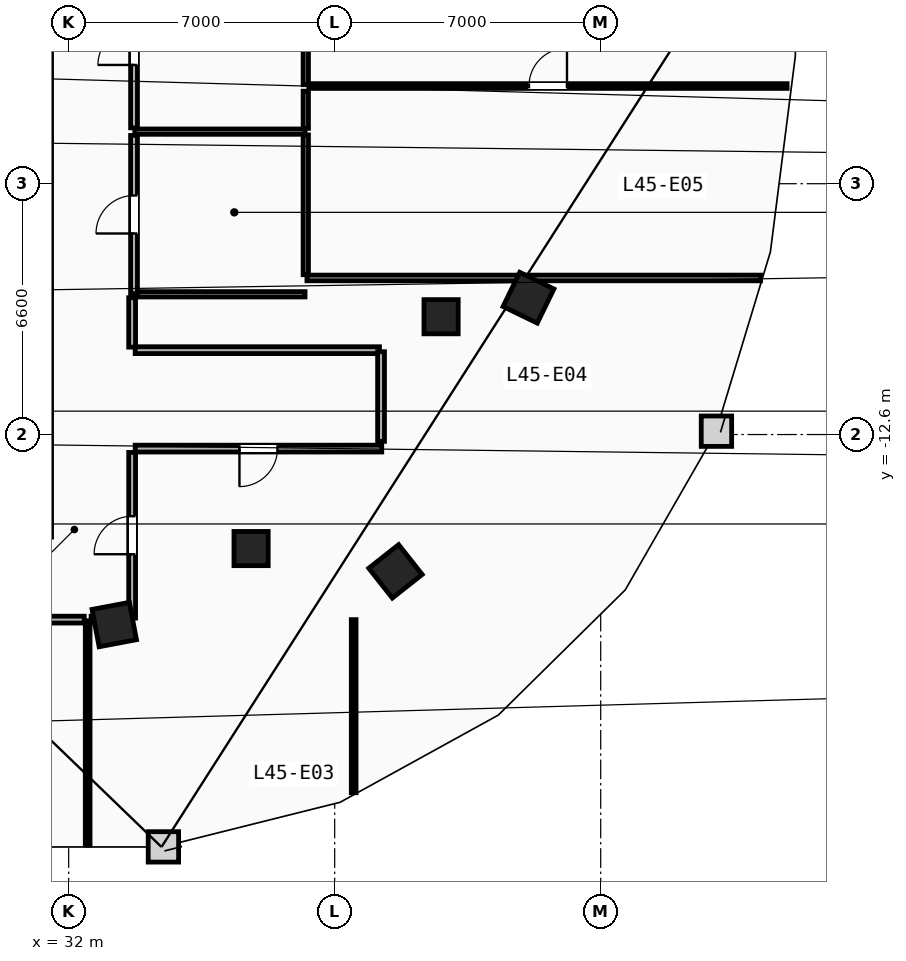
"""IFC4 building model, lengths in metres.
Left out: names, types, materials, properties, quantities, classifications, styles, units other than length and angle.
Written with IfcOpenShell. Run it as: python <this file> out.ifc"""

import sys

from ifc_helpers import new_model, si_unit, direction, frame, frame_2d, origin, origin_2d, place, context, subcontext, project, spatial, rectangle, extrude, element, fill, save


model = new_model("IFC4")
c1 = context("Model", 3, precision=1e-05, world=origin(), true_north=direction((0.0, 1.0)))
c2 = subcontext(c1, "Body", "Model", "MODEL_VIEW")
j1 = project(units=[si_unit("LENGTHUNIT", "METRE"), si_unit("PLANEANGLEUNIT", "RADIAN")], contexts=[c1])
p1 = place(None, origin())
s1 = spatial("IfcSite", under=j1, at=p1, CompositionType="ELEMENT")
p2 = place(p1, origin())
s2 = spatial("IfcBuilding", under=s1, at=p2, CompositionType="ELEMENT")
p3 = place(p2, frame((0.0, 0.0, 172.8)))
s3 = spatial("IfcBuildingStorey", under=s2, at=p3, CompositionType="ELEMENT", Elevation=172.8)
for number, where, z_axis, x_axis in (
    (1, (41.8, -9.5, 0.0), (0.0, 0.0, 1.0), (1.0, 0.0, 0.0)),
    (2, (36.8, -15.6, 0.0), (0.0, 0.0, 1.0), (1.0, 0.0, 0.0)),
):
    element("IfcColumn", number, at=place(p3, frame(where, z_axis=z_axis, x_axis=x_axis)), inside=s3, PredefinedType="COLUMN", context=c2, shape_type="SweptSolid", body=[
        extrude(rectangle(XDim=0.9, YDim=0.9, at=origin_2d()), origin(), (0.0, 0.0, 1.0), 3.6),
    ])
for number, where, z_axis, x_axis in (
    (3, (33.2, -17.6, 0.0), (0.0, 0.0, 1.0), (0.983, 0.186, 0.0)),
    (4, (40.6, -16.2, 0.0), (0.0, 0.0, 1.0), (0.785, 0.619, 0.0)),
    (5, (44.1, -9.0, 0.0), (0.0, 0.0, 1.0), (0.437, 0.899, 0.0)),
):
    element("IfcColumn", number, at=place(p3, frame(where, z_axis=z_axis, x_axis=x_axis)), inside=s3, PredefinedType="COLUMN", context=c2, shape_type="SweptSolid", body=[
        extrude(rectangle(XDim=1.0, YDim=1.0, at=origin_2d()), origin(), (0.0, 0.0, 1.0), 3.6),
    ])
p4 = place(p3, frame((38.24, -8.395, 0.0), z_axis=(0.0, 0.0, 1.0), x_axis=(0.0, 1.0, 0.0)))
e6 = element("IfcWall", 6, at=p4, inside=s3, PredefinedType="PARTITIONING", context=c2, shape_type="SweptSolid", body=[
    extrude(rectangle(XDim=3.68, YDim=0.14, at=frame_2d((1.84, 0.0))), origin(), (0.0, 0.0, 1.0), 3.36),
])
p5 = place(p3, frame((38.24, -4.545, 0.0), z_axis=(0.0, 0.0, 1.0), x_axis=(0.0, 1.0, 0.0)))
e7 = element("IfcWall", 7, at=p5, inside=s3, PredefinedType="PARTITIONING", context=c2, shape_type="SweptSolid", body=[
    extrude(rectangle(XDim=0.98, YDim=0.14, at=frame_2d((0.49, 0.0))), origin(), (0.0, 0.0, 1.0), 3.36),
])
p6 = place(p3, frame((38.24, -3.395, 0.0), z_axis=(0.0, 0.0, 1.0), x_axis=(0.0, 1.0, 0.0)))
e8 = element("IfcWall", 8, at=p6, inside=s3, PredefinedType="PARTITIONING", context=c2, shape_type="SweptSolid", body=[
    extrude(rectangle(XDim=3.125, YDim=0.14, at=frame_2d((1.562, 0.0))), origin(), (0.0, 0.0, 1.0), 3.36),
])
for number, where, z_axis, x_axis in (
    (9, (33.74, -4.63, 0.0), (0.0, 0.0, 1.0), (1.0, 0.0, 0.0)),
    (10, (33.74, -8.91, 0.0), (0.0, 0.0, 1.0), (1.0, 0.0, 0.0)),
):
    element("IfcWall", number, at=place(p3, frame(where, z_axis=z_axis, x_axis=x_axis)), inside=s3, PredefinedType="PARTITIONING", context=c2, shape_type="SweptSolid", body=[
        extrude(rectangle(XDim=4.48, YDim=0.14, at=frame_2d((2.24, 0.0))), origin(), (0.0, 0.0, 1.0), 3.36),
    ])
p7 = place(p3, frame((33.72, -4.53, 0.0), z_axis=(0.0, 0.0, 1.0), x_axis=(0.0, 1.0, 0.0)))
e11 = element("IfcWall", 11, at=p7, inside=s3, PredefinedType="PARTITIONING", context=c2, shape_type="SweptSolid", body=[
    extrude(rectangle(XDim=4.26, YDim=0.18, at=frame_2d((2.13, 0.0))), origin(), (0.0, 0.0, 1.0), 3.36),
])
p8 = place(p7, frame((1.655, 0.0, 0.0)))
e12 = element("IfcOpeningElement", 12, at=p8, cuts=e11, PredefinedType="OPENING", context=c2, shape_type="SweptSolid", body=[
    extrude(rectangle(XDim=0.95, YDim=2.1, at=frame_2d((0.475, 1.05))), frame((0.0, 0.1, 0.0), z_axis=(0.0, -1.0, 0.0), x_axis=(1.0, 0.0, 0.0)), (0.0, 0.0, 1.0), 0.2),
])
p9 = place(p3, frame((33.72, -8.89, 0.0), z_axis=(0.0, 0.0, 1.0), x_axis=(0.0, 1.0, 0.0)))
e13 = element("IfcWall", 13, at=p9, inside=s3, PredefinedType="PARTITIONING", context=c2, shape_type="SweptSolid", body=[
    extrude(rectangle(XDim=4.16, YDim=0.18, at=frame_2d((2.08, 0.0))), origin(), (0.0, 0.0, 1.0), 3.36),
])
p10 = place(p9, frame((1.58, 0.0, 0.0)))
e14 = element("IfcOpeningElement", 14, at=p10, cuts=e13, PredefinedType="OPENING", context=c2, shape_type="SweptSolid", body=[
    extrude(rectangle(XDim=1.0, YDim=2.15, at=frame_2d((0.5, 1.075))), frame((0.0, 0.1, 0.0), z_axis=(0.0, -1.0, 0.0), x_axis=(1.0, 0.0, 0.0)), (0.0, 0.0, 1.0), 0.2),
])
p11 = place(p3, frame((38.27, -8.48, 0.0), z_axis=(0.0, 0.0, 1.0), x_axis=(1.0, 0.0, 0.0)))
e15 = element("IfcWall", 15, at=p11, inside=s3, PredefinedType="PARTITIONING", context=c2, shape_type="SweptSolid", body=[
    extrude(rectangle(XDim=11.936, YDim=0.15, at=frame_2d((5.968, 0.0))), origin(), (0.0, 0.0, 1.0), 3.36),
])
p12 = place(p3, frame((32.5, -23.402, 0.0), z_axis=(0.0, 0.0, 1.0), x_axis=(0.0, 1.0, 0.0)))
e16 = element("IfcWall", 16, at=p12, inside=s3, PredefinedType="PARTITIONING", context=c2, shape_type="SweptSolid", body=[
    extrude(rectangle(XDim=5.902, YDim=0.125, at=frame_2d((2.951, 0.0))), origin(), (0.0, 0.0, 1.0), 3.36),
])
p13 = place(p3, frame((39.5, -22.025, 0.0), z_axis=(0.0, 0.0, 1.0), x_axis=(0.0, 1.0, 0.0)))
e17 = element("IfcWall", 17, at=p13, inside=s3, PredefinedType="PARTITIONING", context=c2, shape_type="SweptSolid", body=[
    extrude(rectangle(XDim=4.555, YDim=0.125, at=frame_2d((2.278, 0.0))), origin(), (0.0, 0.0, 1.0), 3.36),
])
p14 = place(p3, frame((24.59, -17.47, 0.0), z_axis=(0.0, 0.0, 1.0), x_axis=(1.0, 0.0, 0.0)))
e18 = element("IfcWall", 18, at=p14, inside=s3, PredefinedType="PARTITIONING", context=c2, shape_type="SweptSolid", body=[
    extrude(rectangle(XDim=7.82, YDim=0.18, at=frame_2d((3.91, 0.0))), origin(), (0.0, 0.0, 1.0), 3.36),
])
p15 = place(p14, frame((3.41, 0.0, 0.0)))
e19 = element("IfcOpeningElement", 19, at=p15, cuts=e18, PredefinedType="OPENING", context=c2, shape_type="SweptSolid", body=[
    extrude(rectangle(XDim=1.0, YDim=2.15, at=frame_2d((0.5, 1.075))), frame((0.0, 0.1, 0.0), z_axis=(0.0, -1.0, 0.0), x_axis=(1.0, 0.0, 0.0)), (0.0, 0.0, 1.0), 0.2),
])
p16 = place(p3, frame((33.67, -17.428, 0.0), z_axis=(0.0, 0.0, 1.0), x_axis=(0.0, 1.0, 0.0)))
e20 = element("IfcWall", 20, at=p16, inside=s3, PredefinedType="PARTITIONING", context=c2, shape_type="SweptSolid", body=[
    extrude(rectangle(XDim=4.358, YDim=0.18, at=frame_2d((2.179, 0.0))), origin(), (0.0, 0.0, 1.0), 3.36),
])
p17 = place(p16, frame((1.679, 0.0, 0.0)))
e21 = element("IfcOpeningElement", 21, at=p17, cuts=e20, PredefinedType="OPENING", context=c2, shape_type="SweptSolid", body=[
    extrude(rectangle(XDim=1.0, YDim=2.15, at=frame_2d((0.5, 1.075))), frame((0.0, 0.1, 0.0), z_axis=(0.0, -1.0, 0.0), x_axis=(1.0, 0.0, 0.0)), (0.0, 0.0, 1.0), 0.2),
])
p18 = place(p3, frame((32.59, -17.47, 0.0), z_axis=(0.0, 0.0, 1.0), x_axis=(1.0, 0.0, 0.0)))
e22 = element("IfcWall", 22, at=p18, inside=s3, PredefinedType="PARTITIONING", context=c2, shape_type="SweptSolid", body=[
    extrude(rectangle(XDim=1.038, YDim=0.18, at=frame_2d((0.519, 0.0))), origin(), (0.0, 0.0, 1.0), 3.36),
])
p19 = place(p3, frame((40.239, -12.97, 0.0), z_axis=(0.0, 0.0, 1.0), x_axis=(-1.0, 0.0, 0.0)))
e23 = element("IfcWall", 23, at=p19, inside=s3, PredefinedType="PARTITIONING", context=c2, shape_type="SweptSolid", body=[
    extrude(rectangle(XDim=6.489, YDim=0.18, at=frame_2d((3.244, 0.0))), origin(), (0.0, 0.0, 1.0), 3.36),
])
p20 = place(p19, frame((2.744, 0.0, 0.0)))
e24 = element("IfcOpeningElement", 24, at=p20, cuts=e23, PredefinedType="OPENING", context=c2, shape_type="SweptSolid", body=[
    extrude(rectangle(XDim=1.0, YDim=2.15, at=frame_2d((0.5, 1.075))), frame((0.0, 0.1, 0.0), z_axis=(0.0, -1.0, 0.0), x_axis=(1.0, 0.0, 0.0)), (0.0, 0.0, 1.0), 0.2),
])
p21 = place(p3, frame((40.178, -10.38, 0.0), z_axis=(0.0, 0.0, 1.0), x_axis=(-1.0, 0.0, 0.0)))
e25 = element("IfcWall", 25, at=p21, inside=s3, PredefinedType="PARTITIONING", context=c2, shape_type="SweptSolid", body=[
    extrude(rectangle(XDim=6.428, YDim=0.18, at=frame_2d((3.214, 0.0))), origin(), (0.0, 0.0, 1.0), 3.36),
])
p22 = place(p3, frame((40.22, -12.779, 0.0), z_axis=(0.0, 0.0, 1.0), x_axis=(0.0, 1.0, 0.0)))
e26 = element("IfcWall", 26, at=p22, inside=s3, PredefinedType="PARTITIONING", context=c2, shape_type="SweptSolid", body=[
    extrude(rectangle(XDim=2.357, YDim=0.18, at=frame_2d((1.179, 0.0))), origin(), (0.0, 0.0, 1.0), 3.36),
])
p23 = place(p3, frame((33.67, -10.3, 0.0), z_axis=(0.0, 0.0, 1.0), x_axis=(0.0, 1.0, 0.0)))
e27 = element("IfcWall", 27, at=p23, inside=s3, PredefinedType="PARTITIONING", context=c2, shape_type="SweptSolid", body=[
    extrude(rectangle(XDim=1.299, YDim=0.18, at=frame_2d((0.649, 0.0))), origin(), (0.0, 0.0, 1.0), 3.36),
])
p24 = place(p3, frame((38.32, -3.43, 0.0), z_axis=(0.0, 0.0, 1.0), x_axis=(1.0, 0.0, 0.0)))
e28 = element("IfcWall", 28, at=p24, inside=s3, PredefinedType="PARTITIONING", context=c2, shape_type="SweptSolid", body=[
    extrude(rectangle(XDim=12.585, YDim=0.125, at=frame_2d((6.293, 0.0))), origin(), (0.0, 0.0, 1.0), 3.36),
])
p25 = place(p24, frame((5.793, 0.0, 0.0)))
e29 = element("IfcOpeningElement", 29, at=p25, cuts=e28, PredefinedType="OPENING", context=c2, shape_type="SweptSolid", body=[
    extrude(rectangle(XDim=1.0, YDim=2.15, at=frame_2d((0.5, 1.075))), frame((0.0, 0.073, 0.0), z_axis=(0.0, -1.0, 0.0), x_axis=(1.0, 0.0, 0.0)), (0.0, 0.0, 1.0), 0.145),
])
p26 = place(p25, origin())
e30 = element("IfcDoor", 30, at=p26, inside=s3, OperationType="SINGLE_SWING_RIGHT", PredefinedType="DOOR", context=c2, shape_type="SweptSolid", body=[
    extrude(rectangle(XDim=1.0, YDim=2.15, at=frame_2d((0.5, 1.075))), frame((0.0, 0.025, 0.0), z_axis=(0.0, -1.0, 0.0), x_axis=(1.0, 0.0, 0.0)), (0.0, 0.0, 1.0), 0.05),
])
fill(e29, e30)
p27 = place(p20, origin())
e31 = element("IfcDoor", 31, at=p27, inside=s3, OperationType="SINGLE_SWING_RIGHT", PredefinedType="DOOR", context=c2, shape_type="SweptSolid", body=[
    extrude(rectangle(XDim=1.0, YDim=2.15, at=frame_2d((0.5, 1.075))), frame((0.0, 0.025, 0.0), z_axis=(0.0, -1.0, 0.0), x_axis=(1.0, 0.0, 0.0)), (0.0, 0.0, 1.0), 0.05),
])
fill(e24, e31)
p28 = place(p17, origin())
e32 = element("IfcDoor", 32, at=p28, inside=s3, OperationType="SINGLE_SWING_LEFT", PredefinedType="DOOR", context=c2, shape_type="SweptSolid", body=[
    extrude(rectangle(XDim=1.0, YDim=2.15, at=frame_2d((0.5, 1.075))), frame((0.0, 0.025, 0.0), z_axis=(0.0, -1.0, 0.0), x_axis=(1.0, 0.0, 0.0)), (0.0, 0.0, 1.0), 0.05),
])
fill(e21, e32)
p29 = place(p8, origin())
e33 = element("IfcDoor", 33, at=p29, inside=s3, OperationType="SINGLE_SWING_LEFT", PredefinedType="DOOR", context=c2, shape_type="SweptSolid", body=[
    extrude(rectangle(XDim=0.95, YDim=2.1, at=frame_2d((0.475, 1.05))), frame((0.0, 0.025, 0.0), z_axis=(0.0, -1.0, 0.0), x_axis=(1.0, 0.0, 0.0)), (0.0, 0.0, 1.0), 0.05),
])
fill(e12, e33)
p30 = place(p10, origin())
e34 = element("IfcDoor", 34, at=p30, inside=s3, OperationType="SINGLE_SWING_LEFT", PredefinedType="DOOR", context=c2, shape_type="SweptSolid", body=[
    extrude(rectangle(XDim=1.0, YDim=2.15, at=frame_2d((0.5, 1.075))), frame((0.0, 0.025, 0.0), z_axis=(0.0, -1.0, 0.0), x_axis=(1.0, 0.0, 0.0)), (0.0, 0.0, 1.0), 0.05),
])
fill(e14, e34)
save(model, sys.argv[1])
